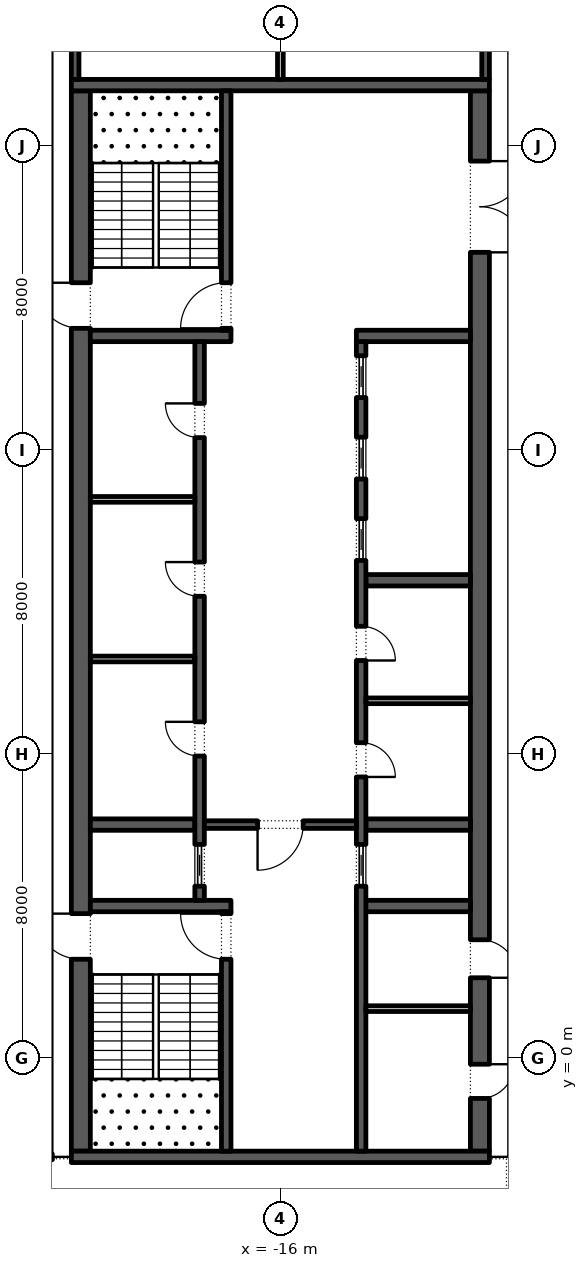
"""IFC4 building model, lengths in metres.
Left out: names, types, materials, properties, quantities, classifications, styles, units other than length and angle.
Written with IfcOpenShell. Run it as: python <this file> out.ifc"""

import sys

from ifc_helpers import new_model, si_unit, direction, frame, frame_2d, origin, place, context, subcontext, project, spatial, rectangle, extrude, element, fill, save


model = new_model("IFC4")
c1 = context("Model", 3, precision=1e-05, world=origin(), true_north=direction((0.0, 1.0)))
c2 = subcontext(c1, "Body", "Model", "MODEL_VIEW")
j1 = project(units=[si_unit("LENGTHUNIT", "METRE"), si_unit("PLANEANGLEUNIT", "RADIAN")], contexts=[c1])
p1 = place(None, origin())
s1 = spatial("IfcSite", under=j1, at=p1, CompositionType="ELEMENT")
p2 = place(p1, origin())
s2 = spatial("IfcBuilding", under=s1, at=p2, CompositionType="ELEMENT")
p3 = place(p2, frame((0.0, 0.0, 346.8)))
s3 = spatial("IfcBuildingStorey", under=s2, at=p3, CompositionType="ELEMENT", Elevation=346.8)
p4 = place(p3, frame((-21.25, -2.45, 0.0), z_axis=(0.0, 0.0, 1.0), x_axis=(0.0, 1.0, 0.0)))
e1 = element("IfcWall", 1, at=p4, inside=s3, PredefinedType="SHEAR", context=c2, shape_type="SweptSolid", body=[
    extrude(rectangle(XDim=27.9, YDim=0.5, at=frame_2d((13.95, 0.0))), origin(), (0.0, 0.0, 1.0), 4.0),
])
p5 = place(p4, frame((5.05, 0.0, 0.0)))
e2 = element("IfcOpeningElement", 2, at=p5, cuts=e1, PredefinedType="OPENING", context=c2, shape_type="SweptSolid", body=[
    extrude(rectangle(XDim=1.2, YDim=2.1, at=frame_2d((0.6, 1.05))), frame((0.0, 0.26, 0.0), z_axis=(0.0, -1.0, 0.0), x_axis=(1.0, 0.0, 0.0)), (0.0, 0.0, 1.0), 0.52),
])
p6 = place(p4, frame((21.65, 0.0, 0.0)))
e3 = element("IfcOpeningElement", 3, at=p6, cuts=e1, PredefinedType="OPENING", context=c2, shape_type="SweptSolid", body=[
    extrude(rectangle(XDim=1.2, YDim=2.1, at=frame_2d((0.6, 1.05))), frame((0.0, 0.26, 0.0), z_axis=(0.0, -1.0, 0.0), x_axis=(1.0, 0.0, 0.0)), (0.0, 0.0, 1.0), 0.52),
])
p7 = place(p3, frame((-10.75, -2.45, 0.0), z_axis=(0.0, 0.0, 1.0), x_axis=(0.0, 1.0, 0.0)))
e4 = element("IfcWall", 4, at=p7, inside=s3, PredefinedType="SHEAR", context=c2, shape_type="SweptSolid", body=[
    extrude(rectangle(XDim=27.9, YDim=0.5, at=frame_2d((13.95, 0.0))), origin(), (0.0, 0.0, 1.0), 4.0),
])
p8 = place(p7, frame((23.65, 0.0, 0.0)))
e5 = element("IfcOpeningElement", 5, at=p8, cuts=e4, PredefinedType="OPENING", context=c2, shape_type="SweptSolid", body=[
    extrude(rectangle(XDim=2.4, YDim=2.1, at=frame_2d((1.2, 1.05))), frame((0.0, 0.26, 0.0), z_axis=(0.0, -1.0, 0.0), x_axis=(1.0, 0.0, 0.0)), (0.0, 0.0, 1.0), 0.52),
])
p9 = place(p7, frame((1.387, 0.0, 0.0)))
e6 = element("IfcOpeningElement", 6, at=p9, cuts=e4, PredefinedType="OPENING", context=c2, shape_type="SweptSolid", body=[
    extrude(rectangle(XDim=0.9, YDim=2.1, at=frame_2d((0.45, 1.05))), frame((0.0, 0.26, 0.0), z_axis=(0.0, -1.0, 0.0), x_axis=(1.0, 0.0, 0.0)), (0.0, 0.0, 1.0), 0.52),
])
p10 = place(p7, frame((4.562, 0.0, 0.0)))
e7 = element("IfcOpeningElement", 7, at=p10, cuts=e4, PredefinedType="OPENING", context=c2, shape_type="SweptSolid", body=[
    extrude(rectangle(XDim=1.0, YDim=2.1, at=frame_2d((0.5, 1.05))), frame((0.0, 0.26, 0.0), z_axis=(0.0, -1.0, 0.0), x_axis=(1.0, 0.0, 0.0)), (0.0, 0.0, 1.0), 0.52),
])
for number, where, z_axis, x_axis in (
    (8, (-21.5, -2.6, 0.0), (0.0, 0.0, 1.0), (1.0, 0.0, 0.0)),
    (9, (-21.5, 25.6, 0.0), (0.0, 0.0, 1.0), (1.0, 0.0, 0.0)),
):
    element("IfcWall", number, at=place(p3, frame(where, z_axis=z_axis, x_axis=x_axis)), inside=s3, PredefinedType="SHEAR", context=c2, shape_type="SweptSolid", body=[
        extrude(rectangle(XDim=11.0, YDim=0.3, at=frame_2d((5.5, 0.0))), origin(), (0.0, 0.0, 1.0), 4.0),
    ])
p11 = place(p3, frame((-21.0, 4.0, 0.0), z_axis=(0.0, 0.0, 1.0), x_axis=(1.0, 0.0, 0.0)))
e10 = element("IfcWall", 10, at=p11, inside=s3, PredefinedType="SHEAR", context=c2, shape_type="SweptSolid", body=[
    extrude(rectangle(XDim=3.7, YDim=0.3, at=frame_2d((1.85, 0.0))), origin(), (0.0, 0.0, 1.0), 4.0),
])
p12 = place(p3, frame((-17.425, -2.45, 0.0), z_axis=(0.0, 0.0, 1.0), x_axis=(0.0, 1.0, 0.0)))
e11 = element("IfcWall", 11, at=p12, inside=s3, PredefinedType="SHEAR", context=c2, shape_type="SweptSolid", body=[
    extrude(rectangle(XDim=6.3, YDim=0.25, at=frame_2d((3.15, 0.0))), origin(), (0.0, 0.0, 1.0), 4.0),
])
p13 = place(p12, frame((5.05, 0.0, 0.0)))
e12 = element("IfcOpeningElement", 12, at=p13, cuts=e11, PredefinedType="OPENING", context=c2, shape_type="SweptSolid", body=[
    extrude(rectangle(XDim=1.2, YDim=2.1, at=frame_2d((0.6, 1.05))), frame((0.0, 0.135, 0.0), z_axis=(0.0, -1.0, 0.0), x_axis=(1.0, 0.0, 0.0)), (0.0, 0.0, 1.0), 0.27),
])
p14 = place(p3, frame((-21.0, 19.0, 0.0), z_axis=(0.0, 0.0, 1.0), x_axis=(1.0, 0.0, 0.0)))
e13 = element("IfcWall", 13, at=p14, inside=s3, PredefinedType="SHEAR", context=c2, shape_type="SweptSolid", body=[
    extrude(rectangle(XDim=3.7, YDim=0.3, at=frame_2d((1.85, 0.0))), origin(), (0.0, 0.0, 1.0), 4.0),
])
p15 = place(p3, frame((-17.425, 19.15, 0.0), z_axis=(0.0, 0.0, 1.0), x_axis=(0.0, 1.0, 0.0)))
e14 = element("IfcWall", 14, at=p15, inside=s3, PredefinedType="SHEAR", context=c2, shape_type="SweptSolid", body=[
    extrude(rectangle(XDim=6.3, YDim=0.25, at=frame_2d((3.15, 0.0))), origin(), (0.0, 0.0, 1.0), 4.0),
])
p16 = place(p15, frame((0.05, 0.0, 0.0)))
e15 = element("IfcOpeningElement", 15, at=p16, cuts=e14, PredefinedType="OPENING", context=c2, shape_type="SweptSolid", body=[
    extrude(rectangle(XDim=1.2, YDim=2.1, at=frame_2d((0.6, 1.05))), frame((0.0, 0.135, 0.0), z_axis=(0.0, -1.0, 0.0), x_axis=(1.0, 0.0, 0.0)), (0.0, 0.0, 1.0), 0.27),
])
p17 = place(p3, frame((-21.0, 6.143, 0.0), z_axis=(0.0, 0.0, 1.0), x_axis=(1.0, 0.0, 0.0)))
e16 = element("IfcWall", 16, at=p17, inside=s3, PredefinedType="SHEAR", context=c2, shape_type="SweptSolid", body=[
    extrude(rectangle(XDim=2.75, YDim=0.3, at=frame_2d((1.375, 0.0))), origin(), (0.0, 0.0, 1.0), 4.0),
])
p18 = place(p3, frame((-18.125, 4.15, 0.0), z_axis=(0.0, 0.0, 1.0), x_axis=(0.0, 1.0, 0.0)))
e17 = element("IfcWall", 17, at=p18, inside=s3, PredefinedType="SHEAR", context=c2, shape_type="SweptSolid", body=[
    extrude(rectangle(XDim=14.7, YDim=0.25, at=frame_2d((7.35, 0.0))), origin(), (0.0, 0.0, 1.0), 4.0),
])
p19 = place(p18, frame((3.796, 0.0, 0.0)))
e18 = element("IfcOpeningElement", 18, at=p19, cuts=e17, PredefinedType="OPENING", context=c2, shape_type="SweptSolid", body=[
    extrude(rectangle(XDim=0.9, YDim=2.1, at=frame_2d((0.45, 1.05))), frame((0.0, 0.135, 0.0), z_axis=(0.0, -1.0, 0.0), x_axis=(1.0, 0.0, 0.0)), (0.0, 0.0, 1.0), 0.27),
])
p20 = place(p18, frame((8.0, 0.0, 0.0)))
e19 = element("IfcOpeningElement", 19, at=p20, cuts=e17, PredefinedType="OPENING", context=c2, shape_type="SweptSolid", body=[
    extrude(rectangle(XDim=0.9, YDim=2.1, at=frame_2d((0.45, 1.05))), frame((0.0, 0.135, 0.0), z_axis=(0.0, -1.0, 0.0), x_axis=(1.0, 0.0, 0.0)), (0.0, 0.0, 1.0), 0.27),
])
p21 = place(p18, frame((12.175, 0.0, 0.0)))
e20 = element("IfcOpeningElement", 20, at=p21, cuts=e17, PredefinedType="OPENING", context=c2, shape_type="SweptSolid", body=[
    extrude(rectangle(XDim=0.9, YDim=2.1, at=frame_2d((0.45, 1.05))), frame((0.0, 0.135, 0.0), z_axis=(0.0, -1.0, 0.0), x_axis=(1.0, 0.0, 0.0)), (0.0, 0.0, 1.0), 0.27),
])
p22 = place(p18, frame((0.371, 0.0, 0.0)))
e21 = element("IfcOpeningElement", 21, at=p22, cuts=e17, PredefinedType="OPENING", context=c2, shape_type="SweptSolid", body=[
    extrude(rectangle(XDim=1.1, YDim=2.1, at=frame_2d((0.55, 1.05))), frame((0.0, 0.135, 0.0), z_axis=(0.0, -1.0, 0.0), x_axis=(1.0, 0.0, 0.0)), (0.0, 0.0, 1.0), 0.27),
])
for number, where, z_axis, x_axis in (
    (22, (-21.0, 10.5, 0.0), (0.0, 0.0, 1.0), (1.0, 0.0, 0.0)),
    (23, (-21.0, 14.7, 0.0), (0.0, 0.0, 1.0), (1.0, 0.0, 0.0)),
):
    element("IfcWall", number, at=place(p3, frame(where, z_axis=z_axis, x_axis=x_axis)), inside=s3, PredefinedType="PARTITIONING", context=c2, shape_type="SweptSolid", body=[
        extrude(rectangle(XDim=2.75, YDim=0.15, at=frame_2d((1.375, 0.0))), origin(), (0.0, 0.0, 1.0), 4.0),
    ])
p23 = place(p3, frame((-14.0, 4.0, 0.0), z_axis=(0.0, 0.0, 1.0), x_axis=(1.0, 0.0, 0.0)))
e24 = element("IfcWall", 24, at=p23, inside=s3, PredefinedType="SHEAR", context=c2, shape_type="SweptSolid", body=[
    extrude(rectangle(XDim=3.0, YDim=0.3, at=frame_2d((1.5, 0.0))), origin(), (0.0, 0.0, 1.0), 4.0),
])
for number, where, z_axis, x_axis in (
    (25, (-13.75, 6.143, 0.0), (0.0, 0.0, 1.0), (1.0, 0.0, 0.0)),
    (26, (-13.75, 12.571, 0.0), (0.0, 0.0, 1.0), (1.0, 0.0, 0.0)),
):
    element("IfcWall", number, at=place(p3, frame(where, z_axis=z_axis, x_axis=x_axis)), inside=s3, PredefinedType="SHEAR", context=c2, shape_type="SweptSolid", body=[
        extrude(rectangle(XDim=2.75, YDim=0.3, at=frame_2d((1.375, 0.0))), origin(), (0.0, 0.0, 1.0), 4.0),
    ])
p24 = place(p3, frame((-14.0, 19.0, 0.0), z_axis=(0.0, 0.0, 1.0), x_axis=(1.0, 0.0, 0.0)))
e27 = element("IfcWall", 27, at=p24, inside=s3, PredefinedType="SHEAR", context=c2, shape_type="SweptSolid", body=[
    extrude(rectangle(XDim=3.0, YDim=0.3, at=frame_2d((1.5, 0.0))), origin(), (0.0, 0.0, 1.0), 4.0),
])
p25 = place(p3, frame((-13.875, -2.45, 0.0), z_axis=(0.0, 0.0, 1.0), x_axis=(0.0, 1.0, 0.0)))
e28 = element("IfcWall", 28, at=p25, inside=s3, PredefinedType="SHEAR", context=c2, shape_type="SweptSolid", body=[
    extrude(rectangle(XDim=21.3, YDim=0.25, at=frame_2d((10.65, 0.0))), origin(), (0.0, 0.0, 1.0), 4.0),
])
p26 = place(p25, frame((9.846, 0.0, 0.0)))
e29 = element("IfcOpeningElement", 29, at=p26, cuts=e28, PredefinedType="OPENING", context=c2, shape_type="SweptSolid", body=[
    extrude(rectangle(XDim=0.9, YDim=2.1, at=frame_2d((0.45, 1.05))), frame((0.0, 0.135, 0.0), z_axis=(0.0, -1.0, 0.0), x_axis=(1.0, 0.0, 0.0)), (0.0, 0.0, 1.0), 0.27),
])
p27 = place(p25, frame((12.911, 0.0, 0.0)))
e30 = element("IfcOpeningElement", 30, at=p27, cuts=e28, PredefinedType="OPENING", context=c2, shape_type="SweptSolid", body=[
    extrude(rectangle(XDim=0.9, YDim=2.1, at=frame_2d((0.45, 1.05))), frame((0.0, 0.135, 0.0), z_axis=(0.0, -1.0, 0.0), x_axis=(1.0, 0.0, 0.0)), (0.0, 0.0, 1.0), 0.27),
])
p28 = place(p25, frame((6.971, 0.0, 0.0)))
e31 = element("IfcOpeningElement", 31, at=p28, cuts=e28, PredefinedType="OPENING", context=c2, shape_type="SweptSolid", body=[
    extrude(rectangle(XDim=1.1, YDim=2.1, at=frame_2d((0.55, 1.05))), frame((0.0, 0.135, 0.0), z_axis=(0.0, -1.0, 0.0), x_axis=(1.0, 0.0, 0.0)), (0.0, 0.0, 1.0), 0.27),
])
p29 = place(p25, frame((15.543, 0.0, 0.0)))
e32 = element("IfcOpeningElement", 32, at=p29, cuts=e28, PredefinedType="OPENING", context=c2, shape_type="SweptSolid", body=[
    extrude(rectangle(XDim=1.1, YDim=2.1, at=frame_2d((0.55, 1.05))), frame((0.0, 0.135, 0.0), z_axis=(0.0, -1.0, 0.0), x_axis=(1.0, 0.0, 0.0)), (0.0, 0.0, 1.0), 0.27),
])
p30 = place(p25, frame((17.686, 0.0, 0.0)))
e33 = element("IfcOpeningElement", 33, at=p30, cuts=e28, PredefinedType="OPENING", context=c2, shape_type="SweptSolid", body=[
    extrude(rectangle(XDim=1.1, YDim=2.1, at=frame_2d((0.55, 1.05))), frame((0.0, 0.135, 0.0), z_axis=(0.0, -1.0, 0.0), x_axis=(1.0, 0.0, 0.0)), (0.0, 0.0, 1.0), 0.27),
])
p31 = place(p25, frame((19.829, 0.0, 0.0)))
e34 = element("IfcOpeningElement", 34, at=p31, cuts=e28, PredefinedType="OPENING", context=c2, shape_type="SweptSolid", body=[
    extrude(rectangle(XDim=1.1, YDim=2.1, at=frame_2d((0.55, 1.05))), frame((0.0, 0.135, 0.0), z_axis=(0.0, -1.0, 0.0), x_axis=(1.0, 0.0, 0.0)), (0.0, 0.0, 1.0), 0.27),
])
p32 = place(p3, frame((-13.75, 9.4, 0.0), z_axis=(0.0, 0.0, 1.0), x_axis=(1.0, 0.0, 0.0)))
e35 = element("IfcWall", 35, at=p32, inside=s3, PredefinedType="PARTITIONING", context=c2, shape_type="SweptSolid", body=[
    extrude(rectangle(XDim=2.75, YDim=0.15, at=frame_2d((1.375, 0.0))), origin(), (0.0, 0.0, 1.0), 4.0),
])
p33 = place(p3, frame((-18.0, 6.143, 0.0), z_axis=(0.0, 0.0, 1.0), x_axis=(1.0, 0.0, 0.0)))
e36 = element("IfcWall", 36, at=p33, inside=s3, PredefinedType="SHEAR", context=c2, shape_type="SweptSolid", body=[
    extrude(rectangle(XDim=4.0, YDim=0.2, at=frame_2d((2.0, 0.0))), origin(), (0.0, 0.0, 1.0), 4.0),
])
p34 = place(p33, frame((1.4, 0.0, 0.0)))
e37 = element("IfcOpeningElement", 37, at=p34, cuts=e36, PredefinedType="OPENING", context=c2, shape_type="SweptSolid", body=[
    extrude(rectangle(XDim=1.2, YDim=2.1, at=frame_2d((0.6, 1.05))), frame((0.0, 0.11, 0.0), z_axis=(0.0, -1.0, 0.0), x_axis=(1.0, 0.0, 0.0)), (0.0, 0.0, 1.0), 0.22),
])
p35 = place(p3, frame((-13.75, 1.3, 0.0), z_axis=(0.0, 0.0, 1.0), x_axis=(1.0, 0.0, 0.0)))
e38 = element("IfcWall", 38, at=p35, inside=s3, PredefinedType="PARTITIONING", context=c2, shape_type="SweptSolid", body=[
    extrude(rectangle(XDim=2.75, YDim=0.15, at=frame_2d((1.375, 0.0))), origin(), (0.0, 0.0, 1.0), 4.0),
])
p36 = place(p3, frame((-21.4, 25.75, 0.0), z_axis=(0.0, 0.0, 1.0), x_axis=(0.0, 1.0, 0.0)))
e39 = element("IfcWall", 39, at=p36, inside=s3, PredefinedType="SHEAR", context=c2, shape_type="SweptSolid", body=[
    extrude(rectangle(XDim=15.05, YDim=0.2, at=frame_2d((7.525, 0.0))), origin(), (0.0, 0.0, 1.0), 4.0),
])
p37 = place(p36, frame((7.075, 0.0, 0.0)))
e40 = element("IfcOpeningElement", 40, at=p37, cuts=e39, PredefinedType="OPENING", context=c2, shape_type="SweptSolid", body=[
    extrude(rectangle(XDim=0.9, YDim=2.1, at=frame_2d((0.45, 1.05))), frame((0.0, 0.11, 0.0), z_axis=(0.0, -1.0, 0.0), x_axis=(1.0, 0.0, 0.0)), (0.0, 0.0, 1.0), 0.22),
])
p38 = place(p3, frame((-10.6, 25.75, 0.0), z_axis=(0.0, 0.0, 1.0), x_axis=(0.0, 1.0, 0.0)))
e41 = element("IfcWall", 41, at=p38, inside=s3, PredefinedType="SHEAR", context=c2, shape_type="SweptSolid", body=[
    extrude(rectangle(XDim=15.05, YDim=0.2, at=frame_2d((7.525, 0.0))), origin(), (0.0, 0.0, 1.0), 4.0),
])
p39 = place(p38, frame((7.075, 0.0, 0.0)))
e42 = element("IfcOpeningElement", 42, at=p39, cuts=e41, PredefinedType="OPENING", context=c2, shape_type="SweptSolid", body=[
    extrude(rectangle(XDim=0.9, YDim=2.1, at=frame_2d((0.45, 1.05))), frame((0.0, 0.11, 0.0), z_axis=(0.0, -1.0, 0.0), x_axis=(1.0, 0.0, 0.0)), (0.0, 0.0, 1.0), 0.22),
])
p40 = place(p3, frame((-16.0, 25.75, 0.0), z_axis=(0.0, 0.0, 1.0), x_axis=(0.0, 1.0, 0.0)))
e43 = element("IfcWall", 43, at=p40, inside=s3, PredefinedType="PARTITIONING", context=c2, shape_type="SweptSolid", body=[
    extrude(rectangle(XDim=15.05, YDim=0.15, at=frame_2d((7.525, 0.0))), origin(), (0.0, 0.0, 1.0), 4.0),
])
p41 = place(p19, origin())
e44 = element("IfcDoor", 44, at=p41, inside=s3, OperationType="SINGLE_SWING_LEFT", PredefinedType="DOOR", context=c2, shape_type="SweptSolid", body=[
    extrude(rectangle(XDim=0.9, YDim=2.1, at=frame_2d((0.45, 1.05))), frame((0.0, 0.125, 0.0), z_axis=(0.0, -1.0, 0.0), x_axis=(1.0, 0.0, 0.0)), (0.0, 0.0, 1.0), 0.05),
])
fill(e18, e44)
p42 = place(p20, origin())
e45 = element("IfcDoor", 45, at=p42, inside=s3, OperationType="SINGLE_SWING_LEFT", PredefinedType="DOOR", context=c2, shape_type="SweptSolid", body=[
    extrude(rectangle(XDim=0.9, YDim=2.1, at=frame_2d((0.45, 1.05))), frame((0.0, 0.125, 0.0), z_axis=(0.0, -1.0, 0.0), x_axis=(1.0, 0.0, 0.0)), (0.0, 0.0, 1.0), 0.05),
])
fill(e19, e45)
p43 = place(p21, origin())
e46 = element("IfcDoor", 46, at=p43, inside=s3, OperationType="SINGLE_SWING_LEFT", PredefinedType="DOOR", context=c2, shape_type="SweptSolid", body=[
    extrude(rectangle(XDim=0.9, YDim=2.1, at=frame_2d((0.45, 1.05))), frame((0.0, 0.125, 0.0), z_axis=(0.0, -1.0, 0.0), x_axis=(1.0, 0.0, 0.0)), (0.0, 0.0, 1.0), 0.05),
])
fill(e20, e46)
p44 = place(p22, origin())
e47 = element("IfcDoor", 47, at=p44, inside=s3, OperationType="SLIDING_TO_LEFT", PredefinedType="DOOR", context=c2, shape_type="SweptSolid", body=[
    extrude(rectangle(XDim=1.1, YDim=2.1, at=frame_2d((0.55, 1.05))), frame((0.0, 0.025, 0.0), z_axis=(0.0, -1.0, 0.0), x_axis=(1.0, 0.0, 0.0)), (0.0, 0.0, 1.0), 0.05),
])
fill(e21, e47)
p45 = place(p26, frame((0.9, -0.2, 0.0), z_axis=(0.0, 0.0, 1.0), x_axis=(-1.0, 0.0, 0.0)))
e48 = element("IfcDoor", 48, at=p45, inside=s3, OperationType="SINGLE_SWING_LEFT", PredefinedType="DOOR", context=c2, shape_type="SweptSolid", body=[
    extrude(rectangle(XDim=0.9, YDim=2.1, at=frame_2d((0.45, 1.05))), frame((0.0, -0.075, 0.0), z_axis=(0.0, -1.0, 0.0), x_axis=(1.0, 0.0, 0.0)), (0.0, 0.0, 1.0), 0.05),
])
fill(e29, e48)
p46 = place(p27, frame((0.9, -0.2, 0.0), z_axis=(0.0, 0.0, 1.0), x_axis=(-1.0, 0.0, 0.0)))
e49 = element("IfcDoor", 49, at=p46, inside=s3, OperationType="SINGLE_SWING_LEFT", PredefinedType="DOOR", context=c2, shape_type="SweptSolid", body=[
    extrude(rectangle(XDim=0.9, YDim=2.1, at=frame_2d((0.45, 1.05))), frame((0.0, -0.075, 0.0), z_axis=(0.0, -1.0, 0.0), x_axis=(1.0, 0.0, 0.0)), (0.0, 0.0, 1.0), 0.05),
])
fill(e30, e49)
p47 = place(p28, origin())
e50 = element("IfcDoor", 50, at=p47, inside=s3, OperationType="SLIDING_TO_LEFT", PredefinedType="DOOR", context=c2, shape_type="SweptSolid", body=[
    extrude(rectangle(XDim=1.1, YDim=2.1, at=frame_2d((0.55, 1.05))), frame((0.0, 0.025, 0.0), z_axis=(0.0, -1.0, 0.0), x_axis=(1.0, 0.0, 0.0)), (0.0, 0.0, 1.0), 0.05),
])
fill(e31, e50)
p48 = place(p29, origin())
e51 = element("IfcDoor", 51, at=p48, inside=s3, OperationType="SLIDING_TO_LEFT", PredefinedType="DOOR", context=c2, shape_type="SweptSolid", body=[
    extrude(rectangle(XDim=1.1, YDim=2.1, at=frame_2d((0.55, 1.05))), frame((0.0, 0.025, 0.0), z_axis=(0.0, -1.0, 0.0), x_axis=(1.0, 0.0, 0.0)), (0.0, 0.0, 1.0), 0.05),
])
fill(e32, e51)
p49 = place(p30, origin())
e52 = element("IfcDoor", 52, at=p49, inside=s3, OperationType="SLIDING_TO_LEFT", PredefinedType="DOOR", context=c2, shape_type="SweptSolid", body=[
    extrude(rectangle(XDim=1.1, YDim=2.1, at=frame_2d((0.55, 1.05))), frame((0.0, 0.025, 0.0), z_axis=(0.0, -1.0, 0.0), x_axis=(1.0, 0.0, 0.0)), (0.0, 0.0, 1.0), 0.05),
])
fill(e33, e52)
p50 = place(p31, origin())
e53 = element("IfcDoor", 53, at=p50, inside=s3, OperationType="SLIDING_TO_LEFT", PredefinedType="DOOR", context=c2, shape_type="SweptSolid", body=[
    extrude(rectangle(XDim=1.1, YDim=2.1, at=frame_2d((0.55, 1.05))), frame((0.0, 0.025, 0.0), z_axis=(0.0, -1.0, 0.0), x_axis=(1.0, 0.0, 0.0)), (0.0, 0.0, 1.0), 0.05),
])
fill(e34, e53)
p51 = place(p34, frame((1.2, 0.0, 0.0), z_axis=(0.0, 0.0, 1.0), x_axis=(-1.0, 0.0, 0.0)))
e54 = element("IfcDoor", 54, at=p51, inside=s3, OperationType="SINGLE_SWING_LEFT", PredefinedType="DOOR", context=c2, shape_type="SweptSolid", body=[
    extrude(rectangle(XDim=1.2, YDim=2.1, at=frame_2d((0.6, 1.05))), frame((0.0, 0.025, 0.0), z_axis=(0.0, -1.0, 0.0), x_axis=(1.0, 0.0, 0.0)), (0.0, 0.0, 1.0), 0.05),
])
fill(e37, e54)
p52 = place(p8, frame((2.4, 0.0, 0.0), z_axis=(0.0, 0.0, 1.0), x_axis=(-1.0, 0.0, 0.0)))
e55 = element("IfcDoor", 55, at=p52, inside=s3, OperationType="DOUBLE_DOOR_SINGLE_SWING", PredefinedType="DOOR", context=c2, shape_type="SweptSolid", body=[
    extrude(rectangle(XDim=2.4, YDim=2.1, at=frame_2d((1.2, 1.05))), frame((0.0, 0.025, 0.0), z_axis=(0.0, -1.0, 0.0), x_axis=(1.0, 0.0, 0.0)), (0.0, 0.0, 1.0), 0.05),
])
fill(e5, e55)
p53 = place(p13, origin())
e56 = element("IfcDoor", 56, at=p53, inside=s3, OperationType="SINGLE_SWING_LEFT", PredefinedType="DOOR", context=c2, shape_type="SweptSolid", body=[
    extrude(rectangle(XDim=1.2, YDim=2.1, at=frame_2d((0.6, 1.05))), frame((0.0, 0.025, 0.0), z_axis=(0.0, -1.0, 0.0), x_axis=(1.0, 0.0, 0.0)), (0.0, 0.0, 1.0), 0.05),
])
fill(e12, e56)
p54 = place(p5, origin())
e57 = element("IfcDoor", 57, at=p54, inside=s3, OperationType="SINGLE_SWING_LEFT", PredefinedType="DOOR", context=c2, shape_type="SweptSolid", body=[
    extrude(rectangle(XDim=1.2, YDim=2.1, at=frame_2d((0.6, 1.05))), frame((0.0, 0.025, 0.0), z_axis=(0.0, -1.0, 0.0), x_axis=(1.0, 0.0, 0.0)), (0.0, 0.0, 1.0), 0.05),
])
fill(e2, e57)
p55 = place(p16, origin())
e58 = element("IfcDoor", 58, at=p55, inside=s3, OperationType="SINGLE_SWING_RIGHT", PredefinedType="DOOR", context=c2, shape_type="SweptSolid", body=[
    extrude(rectangle(XDim=1.2, YDim=2.1, at=frame_2d((0.6, 1.05))), frame((0.0, 0.025, 0.0), z_axis=(0.0, -1.0, 0.0), x_axis=(1.0, 0.0, 0.0)), (0.0, 0.0, 1.0), 0.05),
])
fill(e15, e58)
p56 = place(p6, origin())
e59 = element("IfcDoor", 59, at=p56, inside=s3, OperationType="SINGLE_SWING_LEFT", PredefinedType="DOOR", context=c2, shape_type="SweptSolid", body=[
    extrude(rectangle(XDim=1.2, YDim=2.1, at=frame_2d((0.6, 1.05))), frame((0.0, 0.025, 0.0), z_axis=(0.0, -1.0, 0.0), x_axis=(1.0, 0.0, 0.0)), (0.0, 0.0, 1.0), 0.05),
])
fill(e3, e59)
p57 = place(p9, frame((0.9, 0.45, 0.0), z_axis=(0.0, 0.0, 1.0), x_axis=(-1.0, 0.0, 0.0)))
e60 = element("IfcDoor", 60, at=p57, inside=s3, OperationType="SINGLE_SWING_RIGHT", PredefinedType="DOOR", context=c2, shape_type="SweptSolid", body=[
    extrude(rectangle(XDim=0.9, YDim=2.1, at=frame_2d((0.45, 1.05))), frame((0.0, 0.25, 0.0), z_axis=(0.0, -1.0, 0.0), x_axis=(1.0, 0.0, 0.0)), (0.0, 0.0, 1.0), 0.05),
])
fill(e6, e60)
p58 = place(p10, frame((1.0, 0.45, 0.0), z_axis=(0.0, 0.0, 1.0), x_axis=(-1.0, 0.0, 0.0)))
e61 = element("IfcDoor", 61, at=p58, inside=s3, OperationType="SINGLE_SWING_LEFT", PredefinedType="DOOR", context=c2, shape_type="SweptSolid", body=[
    extrude(rectangle(XDim=1.0, YDim=2.1, at=frame_2d((0.5, 1.05))), frame((0.0, 0.25, 0.0), z_axis=(0.0, -1.0, 0.0), x_axis=(1.0, 0.0, 0.0)), (0.0, 0.0, 1.0), 0.05),
])
fill(e7, e61)
save(model, sys.argv[1])
